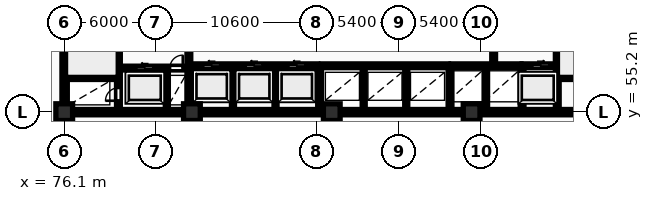
"""IFC4 building model, lengths in metres.
Left out: names, types, materials, properties, quantities, classifications, styles, units other than length and angle.
Written with IfcOpenShell. Run it as: python <this file> out.ifc"""

import sys

from ifc_helpers import new_model, si_unit, direction, frame, frame_2d, origin, origin_2d, place, context, subcontext, project, spatial, rectangle, extrude, element, fill, save


model = new_model("IFC4")
c1 = context("Model", 3, precision=1e-05, world=origin(), true_north=direction((0.0, 1.0)))
c2 = subcontext(c1, "Body", "Model", "MODEL_VIEW")
j1 = project(units=[si_unit("LENGTHUNIT", "METRE"), si_unit("PLANEANGLEUNIT", "RADIAN")], contexts=[c1])
p1 = place(None, origin())
s1 = spatial("IfcSite", under=j1, at=p1, CompositionType="ELEMENT")
p2 = place(p1, origin())
s2 = spatial("IfcBuilding", under=s1, at=p2, CompositionType="ELEMENT")
p3 = place(p2, frame((0.0, 0.0, -7.2)))
s3 = spatial("IfcBuildingStorey", under=s2, at=p3, CompositionType="ELEMENT", Elevation=-7.2)
for number, where, z_axis, x_axis in (
    (1, (76.1, 55.2, 0.0), (0.0, 0.0, 1.0), (1.0, 0.0, 0.0)),
    (2, (84.5, 55.2, 0.0), (0.0, 0.0, 1.0), (1.0, 0.0, 0.0)),
    (3, (93.7, 55.2, 0.0), (0.0, 0.0, 1.0), (1.0, 0.0, 0.0)),
    (4, (102.9, 55.2, 0.0), (0.0, 0.0, 1.0), (1.0, 0.0, 0.0)),
):
    element("IfcColumn", number, at=place(p3, frame(where, z_axis=z_axis, x_axis=x_axis)), inside=s3, PredefinedType="COLUMN", context=c2, shape_type="SweptSolid", body=[
        extrude(rectangle(XDim=1.1, YDim=1.1, at=origin_2d()), origin(), (0.0, 0.0, 1.0), 3.6),
    ])
p4 = place(p3, frame((75.95, 55.2, 0.0), z_axis=(0.0, 0.0, 1.0), x_axis=(1.0, 0.0, 0.0)))
e5 = element("IfcWall", 5, at=p4, inside=s3, PredefinedType="SHEAR", context=c2, shape_type="SweptSolid", body=[
    extrude(rectangle(XDim=36.3, YDim=0.35, at=frame_2d((18.15, 0.0))), origin(), (0.0, 0.0, 1.0), 3.6),
])
p5 = place(p3, frame((76.125, 55.375, 0.0), z_axis=(0.0, 0.0, 1.0), x_axis=(0.0, 1.0, 0.0)))
e6 = element("IfcWall", 6, at=p5, inside=s3, PredefinedType="SHEAR", context=c2, shape_type="SweptSolid", body=[
    extrude(rectangle(XDim=11.65, YDim=0.35, at=frame_2d((5.825, 0.0))), origin(), (0.0, 0.0, 1.0), 3.6),
])
p6 = place(p3, frame((79.665, 55.4, 0.0), z_axis=(0.0, 0.0, 1.0), x_axis=(0.0, 1.0, 0.0)))
e7 = element("IfcWall", 7, at=p6, inside=s3, PredefinedType="SHEAR", context=c2, shape_type="SweptSolid", body=[
    extrude(rectangle(XDim=11.6, YDim=0.25, at=frame_2d((5.8, 0.0))), origin(), (0.0, 0.0, 1.0), 3.6),
])
p7 = place(p6, frame((0.55, 0.0, 0.0)))
e8 = element("IfcOpeningElement", 8, at=p7, cuts=e7, PredefinedType="OPENING", context=c2, shape_type="SweptSolid", body=[
    extrude(rectangle(XDim=0.85, YDim=2.05, at=frame_2d((0.425, 1.025))), frame((0.0, 0.135, 0.0), z_axis=(0.0, -1.0, 0.0), x_axis=(1.0, 0.0, 0.0)), (0.0, 0.0, 1.0), 0.27),
])
p8 = place(p6, frame((8.4, 0.0, 0.0)))
e9 = element("IfcOpeningElement", 9, at=p8, cuts=e7, PredefinedType="OPENING", context=c2, shape_type="SweptSolid", body=[
    extrude(rectangle(XDim=1.1, YDim=2.1, at=frame_2d((0.55, 1.05))), frame((0.0, 0.135, 0.0), z_axis=(0.0, -1.0, 0.0), x_axis=(1.0, 0.0, 0.0)), (0.0, 0.0, 1.0), 0.27),
])
p9 = place(p6, frame((10.25, 0.0, 0.0)))
e10 = element("IfcOpeningElement", 10, at=p9, cuts=e7, PredefinedType="OPENING", context=c2, shape_type="SweptSolid", body=[
    extrude(rectangle(XDim=0.85, YDim=2.05, at=frame_2d((0.425, 1.025))), frame((0.0, 0.135, 0.0), z_axis=(0.0, -1.0, 0.0), x_axis=(1.0, 0.0, 0.0)), (0.0, 0.0, 1.0), 0.27),
])
p10 = place(p3, frame((76.3, 57.475, 0.0), z_axis=(0.0, 0.0, 1.0), x_axis=(1.0, 0.0, 0.0)))
e11 = element("IfcWall", 11, at=p10, inside=s3, PredefinedType="SHEAR", context=c2, shape_type="SweptSolid", body=[
    extrude(rectangle(XDim=3.24, YDim=0.25, at=frame_2d((1.62, 0.0))), origin(), (0.0, 0.0, 1.0), 3.6),
])
p11 = place(p3, frame((79.79, 58.1, 0.0), z_axis=(0.0, 0.0, 1.0), x_axis=(1.0, 0.0, 0.0)))
e12 = element("IfcWall", 12, at=p11, inside=s3, PredefinedType="SHEAR", context=c2, shape_type="SweptSolid", body=[
    extrude(rectangle(XDim=4.39, YDim=0.25, at=frame_2d((2.195, 0.0))), origin(), (0.0, 0.0, 1.0), 3.6),
])
p12 = place(p11, frame((1.05, 0.0, 0.0)))
e13 = element("IfcOpeningElement", 13, at=p12, cuts=e12, PredefinedType="OPENING", context=c2, shape_type="SweptSolid", body=[
    extrude(rectangle(XDim=1.12, YDim=2.12, at=frame_2d((0.56, 1.06))), frame((0.0, 0.135, 0.0), z_axis=(0.0, -1.0, 0.0), x_axis=(1.0, 0.0, 0.0)), (0.0, 0.0, 1.0), 0.27),
])
p13 = place(p11, frame((3.26, 0.0, 0.0)))
e14 = element("IfcOpeningElement", 14, at=p13, cuts=e12, PredefinedType="OPENING", context=c2, shape_type="SweptSolid", body=[
    extrude(rectangle(XDim=0.85, YDim=2.05, at=frame_2d((0.425, 1.025))), frame((0.0, 0.135, 0.0), z_axis=(0.0, -1.0, 0.0), x_axis=(1.0, 0.0, 0.0)), (0.0, 0.0, 1.0), 0.27),
])
p14 = place(p3, frame((82.85, 55.4, 0.0), z_axis=(0.0, 0.0, 1.0), x_axis=(0.0, 1.0, 0.0)))
e15 = element("IfcWall", 15, at=p14, inside=s3, PredefinedType="PARTITIONING", context=c2, shape_type="SweptSolid", body=[
    extrude(rectangle(XDim=2.56, YDim=0.2, at=frame_2d((1.28, 0.0))), origin(), (0.0, 0.0, 1.0), 3.3),
])
p15 = place(p3, frame((84.3, 55.4, 0.0), z_axis=(0.0, 0.0, 1.0), x_axis=(0.0, 1.0, 0.0)))
e16 = element("IfcWall", 16, at=p15, inside=s3, PredefinedType="SHEAR", context=c2, shape_type="SweptSolid", body=[
    extrude(rectangle(XDim=11.6, YDim=0.25, at=frame_2d((5.8, 0.0))), origin(), (0.0, 0.0, 1.0), 3.6),
])
p16 = place(p15, frame((5.2, 0.0, 0.0)))
e17 = element("IfcOpeningElement", 17, at=p16, cuts=e16, PredefinedType="OPENING", context=c2, shape_type="SweptSolid", body=[
    extrude(rectangle(XDim=1.1, YDim=2.1, at=frame_2d((0.55, 1.05))), frame((0.0, 0.135, 0.0), z_axis=(0.0, -1.0, 0.0), x_axis=(1.0, 0.0, 0.0)), (0.0, 0.0, 1.0), 0.27),
])
for number, where, z_axis, x_axis in (
    (18, (87.2, 55.4, 0.0), (0.0, 0.0, 1.0), (0.0, 1.0, 0.0)),
    (19, (90.0, 55.4, 0.0), (0.0, 0.0, 1.0), (0.0, 1.0, 0.0)),
):
    element("IfcWall", number, at=place(p3, frame(where, z_axis=z_axis, x_axis=x_axis)), inside=s3, PredefinedType="PARTITIONING", context=c2, shape_type="SweptSolid", body=[
        extrude(rectangle(XDim=2.72, YDim=0.2, at=frame_2d((1.36, 0.0))), origin(), (0.0, 0.0, 1.0), 3.3),
    ])
p17 = place(p3, frame((84.42, 58.25, 0.0), z_axis=(0.0, 0.0, 1.0), x_axis=(1.0, 0.0, 0.0)))
e20 = element("IfcWall", 20, at=p17, inside=s3, PredefinedType="SHEAR", context=c2, shape_type="SweptSolid", body=[
    extrude(rectangle(XDim=8.36, YDim=0.25, at=frame_2d((4.18, 0.0))), origin(), (0.0, 0.0, 1.0), 3.6),
])
p18 = place(p17, frame((0.82, 0.0, 0.0)))
e21 = element("IfcOpeningElement", 21, at=p18, cuts=e20, PredefinedType="OPENING", context=c2, shape_type="SweptSolid", body=[
    extrude(rectangle(XDim=1.12, YDim=2.12, at=frame_2d((0.56, 1.06))), frame((0.0, 0.135, 0.0), z_axis=(0.0, -1.0, 0.0), x_axis=(1.0, 0.0, 0.0)), (0.0, 0.0, 1.0), 0.27),
])
p19 = place(p17, frame((3.62, 0.0, 0.0)))
e22 = element("IfcOpeningElement", 22, at=p19, cuts=e20, PredefinedType="OPENING", context=c2, shape_type="SweptSolid", body=[
    extrude(rectangle(XDim=1.12, YDim=2.12, at=frame_2d((0.56, 1.06))), frame((0.0, 0.135, 0.0), z_axis=(0.0, -1.0, 0.0), x_axis=(1.0, 0.0, 0.0)), (0.0, 0.0, 1.0), 0.27),
])
p20 = place(p17, frame((6.42, 0.0, 0.0)))
e23 = element("IfcOpeningElement", 23, at=p20, cuts=e20, PredefinedType="OPENING", context=c2, shape_type="SweptSolid", body=[
    extrude(rectangle(XDim=1.12, YDim=2.12, at=frame_2d((0.56, 1.06))), frame((0.0, 0.135, 0.0), z_axis=(0.0, -1.0, 0.0), x_axis=(1.0, 0.0, 0.0)), (0.0, 0.0, 1.0), 0.27),
])
p21 = place(p3, frame((92.9, 55.4, 0.0), z_axis=(0.0, 0.0, 1.0), x_axis=(0.0, 1.0, 0.0)))
e24 = element("IfcWall", 24, at=p21, inside=s3, PredefinedType="SHEAR", context=c2, shape_type="SweptSolid", body=[
    extrude(rectangle(XDim=2.85, YDim=0.25, at=frame_2d((1.425, 0.0))), origin(), (0.0, 0.0, 1.0), 3.6),
])
for number, where, z_axis, x_axis in (
    (25, (95.8, 55.4, 0.0), (0.0, 0.0, 1.0), (0.0, 1.0, 0.0)),
    (26, (98.6, 55.4, 0.0), (0.0, 0.0, 1.0), (0.0, 1.0, 0.0)),
):
    element("IfcWall", number, at=place(p3, frame(where, z_axis=z_axis, x_axis=x_axis)), inside=s3, PredefinedType="PARTITIONING", context=c2, shape_type="SweptSolid", body=[
        extrude(rectangle(XDim=2.72, YDim=0.2, at=frame_2d((1.36, 0.0))), origin(), (0.0, 0.0, 1.0), 3.3),
    ])
p22 = place(p3, frame((93.02, 58.25, 0.0), z_axis=(0.0, 0.0, 1.0), x_axis=(1.0, 0.0, 0.0)))
e27 = element("IfcWall", 27, at=p22, inside=s3, PredefinedType="SHEAR", context=c2, shape_type="SweptSolid", body=[
    extrude(rectangle(XDim=8.36, YDim=0.25, at=frame_2d((4.18, 0.0))), origin(), (0.0, 0.0, 1.0), 3.6),
])
p23 = place(p3, frame((101.48, 55.4, 0.0), z_axis=(0.0, 0.0, 1.0), x_axis=(0.0, 1.0, 0.0)))
e28 = element("IfcWall", 28, at=p23, inside=s3, PredefinedType="SHEAR", context=c2, shape_type="SweptSolid", body=[
    extrude(rectangle(XDim=2.85, YDim=0.25, at=frame_2d((1.425, 0.0))), origin(), (0.0, 0.0, 1.0), 3.6),
])
p24 = place(p3, frame((103.85, 55.4, 0.0), z_axis=(0.0, 0.0, 1.0), x_axis=(0.0, 1.0, 0.0)))
e29 = element("IfcWall", 29, at=p24, inside=s3, PredefinedType="PARTITIONING", context=c2, shape_type="SweptSolid", body=[
    extrude(rectangle(XDim=2.72, YDim=0.2, at=frame_2d((1.36, 0.0))), origin(), (0.0, 0.0, 1.0), 3.3),
])
p25 = place(p3, frame((101.55, 58.25, 0.0), z_axis=(0.0, 0.0, 1.0), x_axis=(1.0, 0.0, 0.0)))
e30 = element("IfcWall", 30, at=p25, inside=s3, PredefinedType="SHEAR", context=c2, shape_type="SweptSolid", body=[
    extrude(rectangle(XDim=4.6, YDim=0.25, at=frame_2d((2.3, 0.0))), origin(), (0.0, 0.0, 1.0), 3.6),
])
p26 = place(p3, frame((106.22, 55.4, 0.0), z_axis=(0.0, 0.0, 1.0), x_axis=(0.0, 1.0, 0.0)))
e31 = element("IfcWall", 31, at=p26, inside=s3, PredefinedType="SHEAR", context=c2, shape_type="SweptSolid", body=[
    extrude(rectangle(XDim=2.85, YDim=0.25, at=frame_2d((1.425, 0.0))), origin(), (0.0, 0.0, 1.0), 3.6),
])
p27 = place(p3, frame((106.22, 58.25, 0.0), z_axis=(0.0, 0.0, 1.0), x_axis=(1.0, 0.0, 0.0)))
e32 = element("IfcWall", 32, at=p27, inside=s3, PredefinedType="SHEAR", context=c2, shape_type="SweptSolid", body=[
    extrude(rectangle(XDim=2.46, YDim=0.25, at=frame_2d((1.23, 0.0))), origin(), (0.0, 0.0, 1.0), 3.6),
])
p28 = place(p27, frame((0.67, 0.0, 0.0)))
e33 = element("IfcOpeningElement", 33, at=p28, cuts=e32, PredefinedType="OPENING", context=c2, shape_type="SweptSolid", body=[
    extrude(rectangle(XDim=1.12, YDim=2.12, at=frame_2d((0.56, 1.06))), frame((0.0, 0.135, 0.0), z_axis=(0.0, -1.0, 0.0), x_axis=(1.0, 0.0, 0.0)), (0.0, 0.0, 1.0), 0.27),
])
p29 = place(p3, frame((104.35, 58.4, 0.0), z_axis=(0.0, 0.0, 1.0), x_axis=(0.0, 1.0, 0.0)))
e34 = element("IfcWall", 34, at=p29, inside=s3, PredefinedType="SHEAR", context=c2, shape_type="SweptSolid", body=[
    extrude(rectangle(XDim=8.6, YDim=0.25, at=frame_2d((4.3, 0.0))), origin(), (0.0, 0.0, 1.0), 3.6),
])
p30 = place(p29, frame((1.8, 0.0, 0.0)))
e35 = element("IfcOpeningElement", 35, at=p30, cuts=e34, PredefinedType="OPENING", context=c2, shape_type="SweptSolid", body=[
    extrude(rectangle(XDim=1.1, YDim=2.1, at=frame_2d((0.55, 1.05))), frame((0.0, 0.135, 0.0), z_axis=(0.0, -1.0, 0.0), x_axis=(1.0, 0.0, 0.0)), (0.0, 0.0, 1.0), 0.27),
])
p31 = place(p3, frame((108.535, 55.4, 0.0), z_axis=(0.0, 0.0, 1.0), x_axis=(0.0, 1.0, 0.0)))
e36 = element("IfcWall", 36, at=p31, inside=s3, PredefinedType="SHEAR", context=c2, shape_type="SweptSolid", body=[
    extrude(rectangle(XDim=11.6, YDim=0.25, at=frame_2d((5.8, 0.0))), origin(), (0.0, 0.0, 1.0), 3.6),
])
p32 = place(p31, frame((8.2, 0.0, 0.0)))
e37 = element("IfcOpeningElement", 37, at=p32, cuts=e36, PredefinedType="OPENING", context=c2, shape_type="SweptSolid", body=[
    extrude(rectangle(XDim=1.1, YDim=2.1, at=frame_2d((0.55, 1.05))), frame((0.0, 0.135, 0.0), z_axis=(0.0, -1.0, 0.0), x_axis=(1.0, 0.0, 0.0)), (0.0, 0.0, 1.0), 0.27),
])
p33 = place(p31, frame((10.25, 0.0, 0.0)))
e38 = element("IfcOpeningElement", 38, at=p33, cuts=e36, PredefinedType="OPENING", context=c2, shape_type="SweptSolid", body=[
    extrude(rectangle(XDim=0.85, YDim=2.05, at=frame_2d((0.425, 1.025))), frame((0.0, 0.135, 0.0), z_axis=(0.0, -1.0, 0.0), x_axis=(1.0, 0.0, 0.0)), (0.0, 0.0, 1.0), 0.27),
])
p34 = place(p3, frame((108.66, 57.475, 0.0), z_axis=(0.0, 0.0, 1.0), x_axis=(1.0, 0.0, 0.0)))
e39 = element("IfcWall", 39, at=p34, inside=s3, PredefinedType="SHEAR", context=c2, shape_type="SweptSolid", body=[
    extrude(rectangle(XDim=3.24, YDim=0.25, at=frame_2d((1.62, 0.0))), origin(), (0.0, 0.0, 1.0), 3.6),
])
p35 = place(p7, origin())
e40 = element("IfcDoor", 40, at=p35, inside=s3, OperationType="SINGLE_SWING_LEFT", PredefinedType="DOOR", context=c2, shape_type="SweptSolid", body=[
    extrude(rectangle(XDim=0.85, YDim=2.05, at=frame_2d((0.425, 1.025))), frame((0.0, 0.025, 0.0), z_axis=(0.0, -1.0, 0.0), x_axis=(1.0, 0.0, 0.0)), (0.0, 0.0, 1.0), 0.05),
])
fill(e8, e40)
p36 = place(p12, origin())
e41 = element("IfcDoor", 41, at=p36, inside=s3, OperationType="SLIDING_TO_LEFT", PredefinedType="DOOR", context=c2, shape_type="SweptSolid", body=[
    extrude(rectangle(XDim=1.12, YDim=2.12, at=frame_2d((0.56, 1.06))), frame((0.0, 0.025, 0.0), z_axis=(0.0, -1.0, 0.0), x_axis=(1.0, 0.0, 0.0)), (0.0, 0.0, 1.0), 0.05),
])
fill(e13, e41)
p37 = place(p13, origin())
e42 = element("IfcDoor", 42, at=p37, inside=s3, OperationType="SINGLE_SWING_RIGHT", PredefinedType="DOOR", context=c2, shape_type="SweptSolid", body=[
    extrude(rectangle(XDim=0.85, YDim=2.05, at=frame_2d((0.425, 1.025))), frame((0.0, 0.025, 0.0), z_axis=(0.0, -1.0, 0.0), x_axis=(1.0, 0.0, 0.0)), (0.0, 0.0, 1.0), 0.05),
])
fill(e14, e42)
p38 = place(p18, origin())
e43 = element("IfcDoor", 43, at=p38, inside=s3, OperationType="SLIDING_TO_LEFT", PredefinedType="DOOR", context=c2, shape_type="SweptSolid", body=[
    extrude(rectangle(XDim=1.12, YDim=2.12, at=frame_2d((0.56, 1.06))), frame((0.0, 0.025, 0.0), z_axis=(0.0, -1.0, 0.0), x_axis=(1.0, 0.0, 0.0)), (0.0, 0.0, 1.0), 0.05),
])
fill(e21, e43)
p39 = place(p19, origin())
e44 = element("IfcDoor", 44, at=p39, inside=s3, OperationType="SLIDING_TO_LEFT", PredefinedType="DOOR", context=c2, shape_type="SweptSolid", body=[
    extrude(rectangle(XDim=1.12, YDim=2.12, at=frame_2d((0.56, 1.06))), frame((0.0, 0.025, 0.0), z_axis=(0.0, -1.0, 0.0), x_axis=(1.0, 0.0, 0.0)), (0.0, 0.0, 1.0), 0.05),
])
fill(e22, e44)
p40 = place(p20, origin())
e45 = element("IfcDoor", 45, at=p40, inside=s3, OperationType="SLIDING_TO_LEFT", PredefinedType="DOOR", context=c2, shape_type="SweptSolid", body=[
    extrude(rectangle(XDim=1.12, YDim=2.12, at=frame_2d((0.56, 1.06))), frame((0.0, 0.025, 0.0), z_axis=(0.0, -1.0, 0.0), x_axis=(1.0, 0.0, 0.0)), (0.0, 0.0, 1.0), 0.05),
])
fill(e23, e45)
p41 = place(p28, origin())
e46 = element("IfcDoor", 46, at=p41, inside=s3, OperationType="SLIDING_TO_RIGHT", PredefinedType="DOOR", context=c2, shape_type="SweptSolid", body=[
    extrude(rectangle(XDim=1.12, YDim=2.12, at=frame_2d((0.56, 1.06))), frame((0.0, 0.025, 0.0), z_axis=(0.0, -1.0, 0.0), x_axis=(1.0, 0.0, 0.0)), (0.0, 0.0, 1.0), 0.05),
])
fill(e33, e46)
save(model, sys.argv[1])
